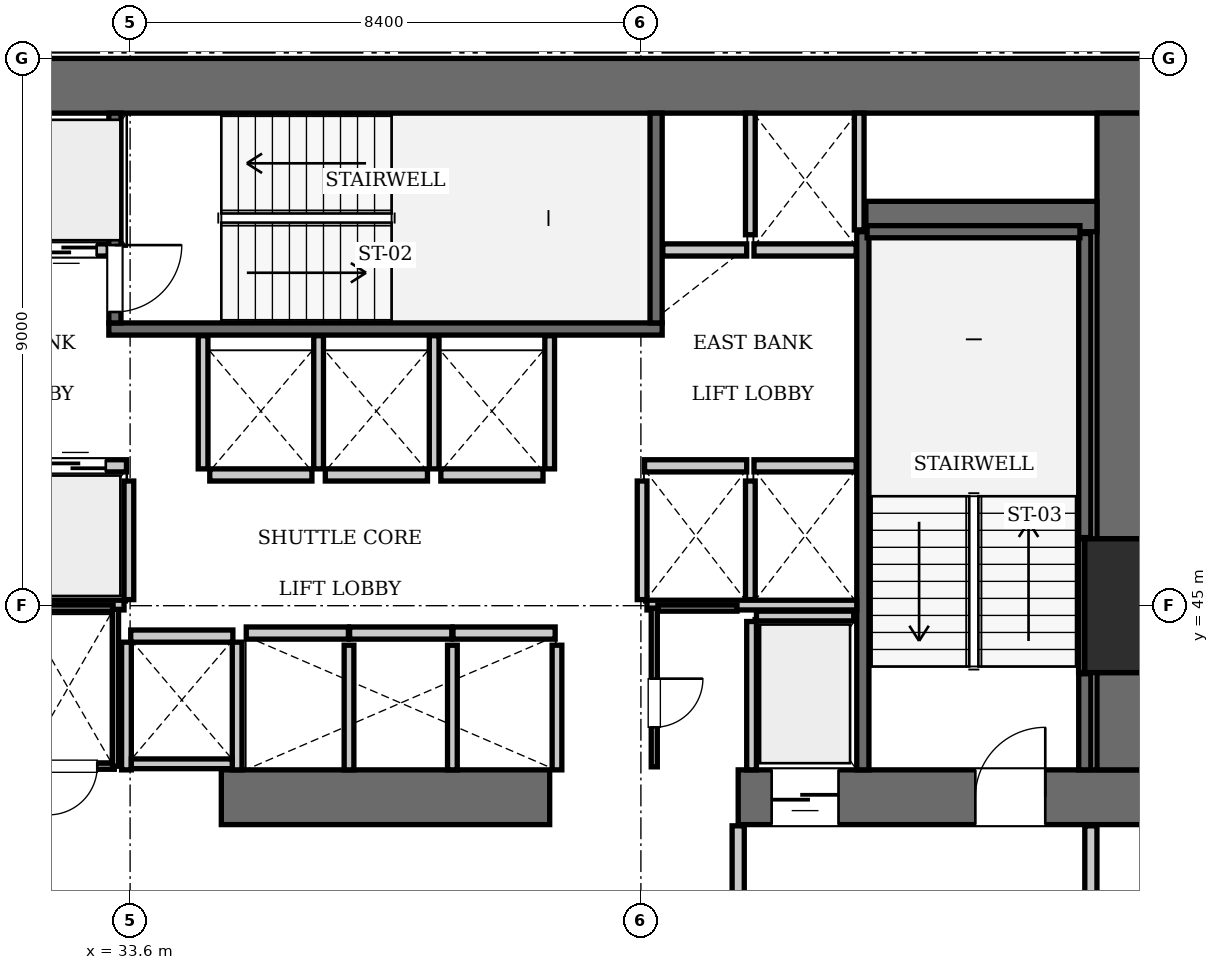
"""IFC4 building model, lengths in metres.
Left out: names, types, materials, properties, quantities, classifications, styles, units other than length and angle.
Written with IfcOpenShell. Run it as: python <this file> out.ifc"""

import sys

from ifc_helpers import new_model, si_unit, direction, frame, frame_2d, origin, origin_2d, place, context, subcontext, project, spatial, rectangle, extrude, element, fill, save


model = new_model("IFC4")
c1 = context("Model", 3, precision=1e-05, world=origin(), true_north=direction((0.0, 1.0)))
c2 = subcontext(c1, "Body", "Model", "MODEL_VIEW")
j1 = project(units=[si_unit("LENGTHUNIT", "METRE"), si_unit("PLANEANGLEUNIT", "RADIAN")], contexts=[c1])
p1 = place(None, origin())
s1 = spatial("IfcSite", under=j1, at=p1, CompositionType="ELEMENT")
p2 = place(p1, origin())
s2 = spatial("IfcBuilding", under=s1, at=p2, CompositionType="ELEMENT")
p3 = place(p2, frame((0.0, 0.0, 80.85)))
s3 = spatial("IfcBuildingStorey", under=s2, at=p3, CompositionType="ELEMENT", Elevation=80.85)
p4 = place(p3, frame((50.4, 45.0, 0.0), z_axis=(0.0, 0.0, 1.0), x_axis=(1.0, 0.0, 0.0)))
e1 = element("IfcColumn", 1, at=p4, inside=s3, PredefinedType="COLUMN", context=c2, shape_type="SweptSolid", body=[
    extrude(rectangle(XDim=2.2, YDim=2.2, at=origin_2d()), origin(), (0.0, 0.0, 1.0), 3.85),
])
p5 = place(p3, frame((25.2, 53.55, 0.0), z_axis=(0.0, 0.0, 1.0), x_axis=(1.0, 0.0, 0.0)))
e2 = element("IfcWall", 2, at=p5, inside=s3, PredefinedType="SHEAR", context=c2, shape_type="SweptSolid", body=[
    extrude(rectangle(XDim=25.2, YDim=0.9, at=frame_2d((12.6, 0.0))), origin(), (0.0, 0.0, 1.0), 3.85),
])
p6 = place(p3, frame((35.1, 41.85, 0.0), z_axis=(0.0, 0.0, 1.0), x_axis=(1.0, 0.0, 0.0)))
e3 = element("IfcWall", 3, at=p6, inside=s3, PredefinedType="SHEAR", context=c2, shape_type="SweptSolid", body=[
    extrude(rectangle(XDim=5.4, YDim=0.9, at=frame_2d((2.7, 0.0))), origin(), (0.0, 0.0, 1.0), 3.85),
])
p7 = place(p3, frame((43.6, 41.85, 0.0), z_axis=(0.0, 0.0, 1.0), x_axis=(1.0, 0.0, 0.0)))
e4 = element("IfcWall", 4, at=p7, inside=s3, PredefinedType="SHEAR", context=c2, shape_type="SweptSolid", body=[
    extrude(rectangle(XDim=6.8, YDim=0.9, at=frame_2d((3.4, 0.0))), origin(), (0.0, 0.0, 1.0), 3.85),
])
p8 = place(p7, frame((3.9, 0.0, 0.0)))
e5 = element("IfcOpeningElement", 5, at=p8, cuts=e4, PredefinedType="OPENING", context=c2, shape_type="SweptSolid", body=[
    extrude(rectangle(XDim=1.15, YDim=2.15, at=frame_2d((0.575, 1.075))), frame((0.0, 0.46, 0.0), z_axis=(0.0, -1.0, 0.0), x_axis=(1.0, 0.0, 0.0)), (0.0, 0.0, 1.0), 0.92),
])
p9 = place(p7, frame((0.55, 0.0, 0.0)))
e6 = element("IfcOpeningElement", 6, at=p9, cuts=e4, PredefinedType="OPENING", context=c2, shape_type="SweptSolid", body=[
    extrude(rectangle(XDim=1.1, YDim=2.2, at=frame_2d((0.55, 1.1))), frame((0.0, 0.46, 0.0), z_axis=(0.0, -1.0, 0.0), x_axis=(1.0, 0.0, 0.0)), (0.0, 0.0, 1.0), 0.92),
])
p10 = place(p3, frame((49.95, 42.3, 0.0), z_axis=(0.0, 0.0, 1.0), x_axis=(0.0, 1.0, 0.0)))
e7 = element("IfcWall", 7, at=p10, inside=s3, PredefinedType="SHEAR", context=c2, shape_type="SweptSolid", body=[
    extrude(rectangle(XDim=1.6, YDim=0.9, at=frame_2d((0.8, 0.0))), origin(), (0.0, 0.0, 1.0), 3.85),
])
p11 = place(p3, frame((49.95, 46.1, 0.0), z_axis=(0.0, 0.0, 1.0), x_axis=(0.0, 1.0, 0.0)))
e8 = element("IfcWall", 8, at=p11, inside=s3, PredefinedType="SHEAR", context=c2, shape_type="SweptSolid", body=[
    extrude(rectangle(XDim=7.0, YDim=0.9, at=frame_2d((3.5, 0.0))), origin(), (0.0, 0.0, 1.0), 3.85),
])
p12 = place(p3, frame((45.7, 51.4, 0.0), z_axis=(0.0, 0.0, 1.0), x_axis=(1.0, 0.0, 0.0)))
e9 = element("IfcWall", 9, at=p12, inside=s3, PredefinedType="SHEAR", context=c2, shape_type="SweptSolid", body=[
    extrude(rectangle(XDim=3.8, YDim=0.5, at=frame_2d((1.9, 0.0))), origin(), (0.0, 0.0, 1.0), 3.85),
])
p13 = place(p3, frame((33.25, 49.55, 0.0), z_axis=(0.0, 0.0, 1.0), x_axis=(1.0, 0.0, 0.0)))
e10 = element("IfcWall", 10, at=p13, inside=s3, PredefinedType="SOLIDWALL", context=c2, shape_type="SweptSolid", body=[
    extrude(rectangle(XDim=9.1, YDim=0.2, at=frame_2d((4.55, 0.0))), origin(), (0.0, 0.0, 1.0), 3.61),
])
p14 = place(p3, frame((42.25, 49.65, 0.0), z_axis=(0.0, 0.0, 1.0), x_axis=(0.0, 1.0, 0.0)))
e11 = element("IfcWall", 11, at=p14, inside=s3, PredefinedType="SOLIDWALL", context=c2, shape_type="SweptSolid", body=[
    extrude(rectangle(XDim=3.45, YDim=0.2, at=frame_2d((1.725, 0.0))), origin(), (0.0, 0.0, 1.0), 3.61),
])
p15 = place(p3, frame((33.35, 49.65, 0.0), z_axis=(0.0, 0.0, 1.0), x_axis=(0.0, 1.0, 0.0)))
e12 = element("IfcWall", 12, at=p15, inside=s3, PredefinedType="SOLIDWALL", context=c2, shape_type="SweptSolid", body=[
    extrude(rectangle(XDim=3.45, YDim=0.2, at=frame_2d((1.725, 0.0))), origin(), (0.0, 0.0, 1.0), 3.61),
])
p16 = place(p15, frame((0.18, 0.0, 0.0)))
e13 = element("IfcOpeningElement", 13, at=p16, cuts=e12, PredefinedType="OPENING", context=c2, shape_type="SweptSolid", body=[
    extrude(rectangle(XDim=1.1, YDim=2.15, at=frame_2d((0.55, 1.075))), frame((0.0, 0.11, 0.0), z_axis=(0.0, -1.0, 0.0), x_axis=(1.0, 0.0, 0.0)), (0.0, 0.0, 1.0), 0.22),
])
p17 = place(p3, frame((45.65, 42.3, 0.0), z_axis=(0.0, 0.0, 1.0), x_axis=(0.0, 1.0, 0.0)))
e14 = element("IfcWall", 14, at=p17, inside=s3, PredefinedType="SOLIDWALL", context=c2, shape_type="SweptSolid", body=[
    extrude(rectangle(XDim=8.85, YDim=0.2, at=frame_2d((4.425, 0.0))), origin(), (0.0, 0.0, 1.0), 3.61),
])
p18 = place(p3, frame((49.3, 42.3, 0.0), z_axis=(0.0, 0.0, 1.0), x_axis=(0.0, 1.0, 0.0)))
e15 = element("IfcWall", 15, at=p18, inside=s3, PredefinedType="SOLIDWALL", context=c2, shape_type="SweptSolid", body=[
    extrude(rectangle(XDim=1.58, YDim=0.2, at=frame_2d((0.79, 0.0))), origin(), (0.0, 0.0, 1.0), 3.61),
])
p19 = place(p3, frame((49.3, 46.12, 0.0), z_axis=(0.0, 0.0, 1.0), x_axis=(0.0, 1.0, 0.0)))
e16 = element("IfcWall", 16, at=p19, inside=s3, PredefinedType="SOLIDWALL", context=c2, shape_type="SweptSolid", body=[
    extrude(rectangle(XDim=5.0, YDim=0.2, at=frame_2d((2.5, 0.0))), origin(), (0.0, 0.0, 1.0), 3.61),
])
p20 = place(p3, frame((45.72, 51.15, 0.0), z_axis=(0.0, 0.0, 1.0), x_axis=(1.0, 0.0, 0.0)))
e17 = element("IfcWall", 17, at=p20, inside=s3, PredefinedType="SOLIDWALL", context=c2, shape_type="SweptSolid", body=[
    extrude(rectangle(XDim=3.5, YDim=0.2, at=frame_2d((1.75, 0.0))), origin(), (0.0, 0.0, 1.0), 3.61),
])
p21 = place(p3, frame((49.248, 43.9, 0.0), z_axis=(0.0, 0.0, 1.0), x_axis=(0.0, 1.0, 0.0)))
e18 = element("IfcWall", 18, at=p21, inside=s3, PredefinedType="SOLIDWALL", context=c2, shape_type="SweptSolid", body=[
    extrude(rectangle(XDim=2.2, YDim=0.1, at=frame_2d((1.1, 0.0))), origin(), (0.0, 0.0, 1.0), 3.61),
])
p22 = place(p3, frame((31.86, 47.3, 0.0), z_axis=(0.0, 0.0, 1.0), x_axis=(1.0, 0.0, 0.0)))
e19 = element("IfcWall", 19, at=p22, inside=s3, PredefinedType="SOLIDWALL", context=c2, shape_type="SweptSolid", body=[
    extrude(rectangle(XDim=1.68, YDim=0.2, at=frame_2d((0.84, 0.0))), origin(), (0.0, 0.0, 1.0), 3.61),
])
p23 = place(p22, frame((0.34, 0.0, 0.0)))
e20 = element("IfcOpeningElement", 20, at=p23, cuts=e19, PredefinedType="OPENING", context=c2, shape_type="SweptSolid", body=[
    extrude(rectangle(XDim=1.0, YDim=2.15, at=frame_2d((0.5, 1.075))), frame((0.0, 0.11, 0.0), z_axis=(0.0, -1.0, 0.0), x_axis=(1.0, 0.0, 0.0)), (0.0, 0.0, 1.0), 0.22),
])
p24 = place(p3, frame((31.86, 50.85, 0.0), z_axis=(0.0, 0.0, 1.0), x_axis=(1.0, 0.0, 0.0)))
e21 = element("IfcWall", 21, at=p24, inside=s3, PredefinedType="SOLIDWALL", context=c2, shape_type="SweptSolid", body=[
    extrude(rectangle(XDim=1.38, YDim=0.2, at=frame_2d((0.69, 0.0))), origin(), (0.0, 0.0, 1.0), 3.61),
])
p25 = place(p24, frame((0.19, 0.0, 0.0)))
e22 = element("IfcOpeningElement", 22, at=p25, cuts=e21, PredefinedType="OPENING", context=c2, shape_type="SweptSolid", body=[
    extrude(rectangle(XDim=1.0, YDim=2.15, at=frame_2d((0.5, 1.075))), frame((0.0, 0.11, 0.0), z_axis=(0.0, -1.0, 0.0), x_axis=(1.0, 0.0, 0.0)), (0.0, 0.0, 1.0), 0.22),
])
for number, where, z_axis, x_axis in (
    (23, (42.06, 47.3, 0.0), (0.0, 0.0, 1.0), (1.0, 0.0, 0.0)),
    (24, (43.86, 47.3, 0.0), (0.0, 0.0, 1.0), (1.0, 0.0, 0.0)),
):
    element("IfcWall", number, at=place(p3, frame(where, z_axis=z_axis, x_axis=x_axis)), inside=s3, PredefinedType="SOLIDWALL", context=c2, shape_type="SweptSolid", body=[
        extrude(rectangle(XDim=1.68, YDim=0.2, at=frame_2d((0.84, 0.0))), origin(), (0.0, 0.0, 1.0), 3.61),
    ])
p26 = place(p3, frame((42.36, 50.85, 0.0), z_axis=(0.0, 0.0, 1.0), x_axis=(1.0, 0.0, 0.0)))
e25 = element("IfcWall", 25, at=p26, inside=s3, PredefinedType="SOLIDWALL", context=c2, shape_type="SweptSolid", body=[
    extrude(rectangle(XDim=1.38, YDim=0.2, at=frame_2d((0.69, 0.0))), origin(), (0.0, 0.0, 1.0), 3.61),
])
for number, where, z_axis, x_axis in (
    (26, (43.86, 50.85, 0.0), (0.0, 0.0, 1.0), (1.0, 0.0, 0.0)),
    (27, (35.51, 44.55, 0.0), (0.0, 0.0, 1.0), (1.0, 0.0, 0.0)),
    (28, (37.21, 44.55, 0.0), (0.0, 0.0, 1.0), (1.0, 0.0, 0.0)),
):
    element("IfcWall", number, at=place(p3, frame(where, z_axis=z_axis, x_axis=x_axis)), inside=s3, PredefinedType="SOLIDWALL", context=c2, shape_type="SweptSolid", body=[
        extrude(rectangle(XDim=1.68, YDim=0.2, at=frame_2d((0.84, 0.0))), origin(), (0.0, 0.0, 1.0), 3.61),
    ])
for number, where, z_axis, x_axis in (
    (29, (38.91, 44.55, 0.0), (0.0, 0.0, 1.0), (1.0, 0.0, 0.0)),
    (30, (34.91, 47.15, 0.0), (0.0, 0.0, 1.0), (1.0, 0.0, 0.0)),
):
    element("IfcWall", number, at=place(p3, frame(where, z_axis=z_axis, x_axis=x_axis)), inside=s3, PredefinedType="SOLIDWALL", context=c2, shape_type="SweptSolid", body=[
        extrude(rectangle(XDim=1.68, YDim=0.2, at=frame_2d((0.84, 0.0))), origin(), (0.0, 0.0, 1.0), 3.61),
    ])
for number, where, z_axis, x_axis in (
    (31, (36.81, 47.15, 0.0), (0.0, 0.0, 1.0), (1.0, 0.0, 0.0)),
    (32, (38.71, 47.15, 0.0), (0.0, 0.0, 1.0), (1.0, 0.0, 0.0)),
    (33, (33.61, 44.5, 0.0), (0.0, 0.0, 1.0), (1.0, 0.0, 0.0)),
):
    element("IfcWall", number, at=place(p3, frame(where, z_axis=z_axis, x_axis=x_axis)), inside=s3, PredefinedType="SOLIDWALL", context=c2, shape_type="SweptSolid", body=[
        extrude(rectangle(XDim=1.68, YDim=0.2, at=frame_2d((0.84, 0.0))), origin(), (0.0, 0.0, 1.0), 3.61),
    ])
p27 = place(p3, frame((43.9, 44.83, 0.0), z_axis=(0.0, 0.0, 1.0), x_axis=(1.0, 0.0, 0.0)))
e34 = element("IfcWall", 34, at=p27, inside=s3, PredefinedType="SOLIDWALL", context=c2, shape_type="SweptSolid", body=[
    extrude(rectangle(XDim=1.6, YDim=0.16, at=frame_2d((0.8, 0.0))), origin(), (0.0, 0.0, 1.0), 3.61),
])
p28 = place(p3, frame((43.82, 42.3, 0.0), z_axis=(0.0, 0.0, 1.0), x_axis=(0.0, 1.0, 0.0)))
e35 = element("IfcWall", 35, at=p28, inside=s3, PredefinedType="SOLIDWALL", context=c2, shape_type="SweptSolid", body=[
    extrude(rectangle(XDim=2.44, YDim=0.16, at=frame_2d((1.22, 0.0))), origin(), (0.0, 0.0, 1.0), 3.61),
])
p29 = place(p3, frame((33.58, 45.1, 0.0), z_axis=(0.0, 0.0, 1.0), x_axis=(0.0, 1.0, 0.0)))
e36 = element("IfcWall", 36, at=p29, inside=s3, PredefinedType="SOLIDWALL", context=c2, shape_type="SweptSolid", body=[
    extrude(rectangle(XDim=1.95, YDim=0.16, at=frame_2d((0.975, 0.0))), origin(), (0.0, 0.0, 1.0), 3.61),
])
p30 = place(p3, frame((30.05, 45.01, 0.0), z_axis=(0.0, 0.0, 1.0), x_axis=(1.0, 0.0, 0.0)))
e37 = element("IfcWall", 37, at=p30, inside=s3, PredefinedType="SOLIDWALL", context=c2, shape_type="SweptSolid", body=[
    extrude(rectangle(XDim=3.45, YDim=0.16, at=frame_2d((1.725, 0.0))), origin(), (0.0, 0.0, 1.0), 3.61),
])
for number, where, z_axis, x_axis in (
    (38, (42.02, 45.1, 0.0), (0.0, 0.0, 1.0), (0.0, 1.0, 0.0)),
    (39, (43.8, 45.1, 0.0), (0.0, 0.0, 1.0), (0.0, 1.0, 0.0)),
):
    element("IfcWall", number, at=place(p3, frame(where, z_axis=z_axis, x_axis=x_axis)), inside=s3, PredefinedType="SOLIDWALL", context=c2, shape_type="SweptSolid", body=[
        extrude(rectangle(XDim=1.95, YDim=0.16, at=frame_2d((0.975, 0.0))), origin(), (0.0, 0.0, 1.0), 3.61),
    ])
p31 = place(p3, frame((42.1, 45.01, 0.0), z_axis=(0.0, 0.0, 1.0), x_axis=(1.0, 0.0, 0.0)))
e40 = element("IfcWall", 40, at=p31, inside=s3, PredefinedType="SOLIDWALL", context=c2, shape_type="SweptSolid", body=[
    extrude(rectangle(XDim=3.45, YDim=0.16, at=frame_2d((1.725, 0.0))), origin(), (0.0, 0.0, 1.0), 3.61),
])
p32 = place(p3, frame((45.59, 51.18, 0.0), z_axis=(0.0, 0.0, 1.0), x_axis=(0.0, 1.0, 0.0)))
e41 = element("IfcWall", 41, at=p32, inside=s3, PredefinedType="SOLIDWALL", context=c2, shape_type="SweptSolid", body=[
    extrude(rectangle(XDim=1.92, YDim=0.16, at=frame_2d((0.96, 0.0))), origin(), (0.0, 0.0, 1.0), 3.61),
])
p33 = place(p3, frame((43.8, 51.1, 0.0), z_axis=(0.0, 0.0, 1.0), x_axis=(0.0, 1.0, 0.0)))
e42 = element("IfcWall", 42, at=p33, inside=s3, PredefinedType="SOLIDWALL", context=c2, shape_type="SweptSolid", body=[
    extrude(rectangle(XDim=2.0, YDim=0.16, at=frame_2d((1.0, 0.0))), origin(), (0.0, 0.0, 1.0), 3.61),
])
for number, where, z_axis, x_axis in (
    (43, (37.2, 42.3, 0.0), (0.0, 0.0, 1.0), (0.0, 1.0, 0.0)),
    (44, (38.9, 42.3, 0.0), (0.0, 0.0, 1.0), (0.0, 1.0, 0.0)),
    (45, (40.62, 42.3, 0.0), (0.0, 0.0, 1.0), (0.0, 1.0, 0.0)),
):
    element("IfcWall", number, at=place(p3, frame(where, z_axis=z_axis, x_axis=x_axis)), inside=s3, PredefinedType="SOLIDWALL", context=c2, shape_type="SweptSolid", body=[
        extrude(rectangle(XDim=2.05, YDim=0.16, at=frame_2d((1.025, 0.0))), origin(), (0.0, 0.0, 1.0), 3.61),
    ])
for number, where, z_axis, x_axis in (
    (46, (34.8, 47.25, 0.0), (0.0, 0.0, 1.0), (0.0, 1.0, 0.0)),
    (47, (36.7, 47.25, 0.0), (0.0, 0.0, 1.0), (0.0, 1.0, 0.0)),
    (48, (38.6, 47.25, 0.0), (0.0, 0.0, 1.0), (0.0, 1.0, 0.0)),
    (49, (40.5, 47.25, 0.0), (0.0, 0.0, 1.0), (0.0, 1.0, 0.0)),
):
    element("IfcWall", number, at=place(p3, frame(where, z_axis=z_axis, x_axis=x_axis)), inside=s3, PredefinedType="SOLIDWALL", context=c2, shape_type="SweptSolid", body=[
        extrude(rectangle(XDim=2.19, YDim=0.16, at=frame_2d((1.095, 0.0))), origin(), (0.0, 0.0, 1.0), 3.61),
    ])
for number, where, z_axis, x_axis in (
    (50, (33.54, 42.3, 0.0), (0.0, 0.0, 1.0), (0.0, 1.0, 0.0)),
    (51, (35.36, 42.3, 0.0), (0.0, 0.0, 1.0), (0.0, 1.0, 0.0)),
):
    element("IfcWall", number, at=place(p3, frame(where, z_axis=z_axis, x_axis=x_axis)), inside=s3, PredefinedType="SOLIDWALL", context=c2, shape_type="SweptSolid", body=[
        extrude(rectangle(XDim=2.1, YDim=0.16, at=frame_2d((1.05, 0.0))), origin(), (0.0, 0.0, 1.0), 3.61),
    ])
p34 = place(p3, frame((33.62, 42.4, 0.0), z_axis=(0.0, 0.0, 1.0), x_axis=(1.0, 0.0, 0.0)))
e52 = element("IfcWall", 52, at=p34, inside=s3, PredefinedType="SOLIDWALL", context=c2, shape_type="SweptSolid", body=[
    extrude(rectangle(XDim=1.66, YDim=0.16, at=frame_2d((0.83, 0.0))), origin(), (0.0, 0.0, 1.0), 3.61),
])
for number, where, z_axis, x_axis in (
    (53, (43.6, 38.31, 0.0), (0.0, 0.0, 1.0), (0.0, 1.0, 0.0)),
    (54, (49.4, 38.31, 0.0), (0.0, 0.0, 1.0), (0.0, 1.0, 0.0)),
):
    element("IfcWall", number, at=place(p3, frame(where, z_axis=z_axis, x_axis=x_axis)), inside=s3, PredefinedType="PARTITIONING", context=c2, shape_type="SweptSolid", body=[
        extrude(rectangle(XDim=3.07, YDim=0.2, at=frame_2d((1.535, 0.0))), origin(), (0.0, 0.0, 1.0), 3.61),
    ])
p35 = place(p3, frame((32.02, 42.36, 0.0), z_axis=(0.0, 0.0, 1.0), x_axis=(1.0, 0.0, 0.0)))
e55 = element("IfcWall", 55, at=p35, inside=s3, PredefinedType="PARTITIONING", context=c2, shape_type="SweptSolid", body=[
    extrude(rectangle(XDim=1.32, YDim=0.1, at=frame_2d((0.66, 0.0))), origin(), (0.0, 0.0, 1.0), 3.61),
])
p36 = place(p35, frame((0.24, 0.0, 0.0)))
e56 = element("IfcOpeningElement", 56, at=p36, cuts=e55, PredefinedType="OPENING", context=c2, shape_type="SweptSolid", body=[
    extrude(rectangle(XDim=0.8, YDim=2.05, at=frame_2d((0.4, 1.025))), frame((0.0, 0.06, 0.0), z_axis=(0.0, -1.0, 0.0), x_axis=(1.0, 0.0, 0.0)), (0.0, 0.0, 1.0), 0.12),
])
p37 = place(p3, frame((31.84, 44.96, 0.0), z_axis=(0.0, 0.0, 1.0), x_axis=(1.0, 0.0, 0.0)))
e57 = element("IfcWall", 57, at=p37, inside=s3, PredefinedType="PARTITIONING", context=c2, shape_type="SweptSolid", body=[
    extrude(rectangle(XDim=1.48, YDim=0.1, at=frame_2d((0.74, 0.0))), origin(), (0.0, 0.0, 1.0), 3.61),
])
p38 = place(p3, frame((33.36, 42.36, 0.0), z_axis=(0.0, 0.0, 1.0), x_axis=(0.0, 1.0, 0.0)))
e58 = element("IfcWall", 58, at=p38, inside=s3, PredefinedType="PARTITIONING", context=c2, shape_type="SweptSolid", body=[
    extrude(rectangle(XDim=2.58, YDim=0.1, at=frame_2d((1.29, 0.0))), origin(), (0.0, 0.0, 1.0), 3.61),
])
p39 = place(p3, frame((42.22, 42.35, 0.0), z_axis=(0.0, 0.0, 1.0), x_axis=(0.0, 1.0, 0.0)))
e59 = element("IfcWall", 59, at=p39, inside=s3, PredefinedType="PARTITIONING", context=c2, shape_type="SweptSolid", body=[
    extrude(rectangle(XDim=2.61, YDim=0.1, at=frame_2d((1.305, 0.0))), origin(), (0.0, 0.0, 1.0), 3.61),
])
p40 = place(p39, frame((0.65, 0.0, 0.0)))
e60 = element("IfcOpeningElement", 60, at=p40, cuts=e59, PredefinedType="OPENING", context=c2, shape_type="SweptSolid", body=[
    extrude(rectangle(XDim=0.8, YDim=2.05, at=frame_2d((0.4, 1.025))), frame((0.0, 0.06, 0.0), z_axis=(0.0, -1.0, 0.0), x_axis=(1.0, 0.0, 0.0)), (0.0, 0.0, 1.0), 0.12),
])
p41 = place(p3, frame((42.28, 44.96, 0.0), z_axis=(0.0, 0.0, 1.0), x_axis=(1.0, 0.0, 0.0)))
e61 = element("IfcWall", 61, at=p41, inside=s3, PredefinedType="PARTITIONING", context=c2, shape_type="SweptSolid", body=[
    extrude(rectangle(XDim=1.3, YDim=0.1, at=frame_2d((0.65, 0.0))), origin(), (0.0, 0.0, 1.0), 3.61),
])
p42 = place(p16, frame((1.1, 0.0, 0.0), z_axis=(0.0, 0.0, 1.0), x_axis=(-1.0, 0.0, 0.0)))
e62 = element("IfcDoor", 62, at=p42, inside=s3, OperationType="SINGLE_SWING_LEFT", PredefinedType="DOOR", context=c2, shape_type="SweptSolid", body=[
    extrude(rectangle(XDim=1.1, YDim=2.15, at=frame_2d((0.55, 1.075))), frame((0.0, 0.025, 0.0), z_axis=(0.0, -1.0, 0.0), x_axis=(1.0, 0.0, 0.0)), (0.0, 0.0, 1.0), 0.05),
])
fill(e13, e62)
p43 = place(p8, origin())
e63 = element("IfcDoor", 63, at=p43, inside=s3, OperationType="SINGLE_SWING_RIGHT", PredefinedType="DOOR", context=c2, shape_type="SweptSolid", body=[
    extrude(rectangle(XDim=1.15, YDim=2.15, at=frame_2d((0.575, 1.075))), frame((0.0, 0.025, 0.0), z_axis=(0.0, -1.0, 0.0), x_axis=(1.0, 0.0, 0.0)), (0.0, 0.0, 1.0), 0.05),
])
fill(e5, e63)
p44 = place(p23, origin())
e64 = element("IfcDoor", 64, at=p44, inside=s3, OperationType="SLIDING_TO_LEFT", PredefinedType="DOOR", context=c2, shape_type="SweptSolid", body=[
    extrude(rectangle(XDim=1.0, YDim=2.15, at=frame_2d((0.5, 1.075))), frame((0.0, 0.025, 0.0), z_axis=(0.0, -1.0, 0.0), x_axis=(1.0, 0.0, 0.0)), (0.0, 0.0, 1.0), 0.05),
])
fill(e20, e64)
p45 = place(p25, frame((1.0, 0.0, 0.0), z_axis=(0.0, 0.0, 1.0), x_axis=(-1.0, 0.0, 0.0)))
e65 = element("IfcDoor", 65, at=p45, inside=s3, OperationType="SLIDING_TO_LEFT", PredefinedType="DOOR", context=c2, shape_type="SweptSolid", body=[
    extrude(rectangle(XDim=1.0, YDim=2.15, at=frame_2d((0.5, 1.075))), frame((0.0, 0.025, 0.0), z_axis=(0.0, -1.0, 0.0), x_axis=(1.0, 0.0, 0.0)), (0.0, 0.0, 1.0), 0.05),
])
fill(e22, e65)
p46 = place(p9, frame((1.1, 0.0, 0.0), z_axis=(0.0, 0.0, 1.0), x_axis=(-1.0, 0.0, 0.0)))
e66 = element("IfcDoor", 66, at=p46, inside=s3, OperationType="SLIDING_TO_LEFT", PredefinedType="DOOR", context=c2, shape_type="SweptSolid", body=[
    extrude(rectangle(XDim=1.1, YDim=2.2, at=frame_2d((0.55, 1.1))), frame((0.0, 0.025, 0.0), z_axis=(0.0, -1.0, 0.0), x_axis=(1.0, 0.0, 0.0)), (0.0, 0.0, 1.0), 0.05),
])
fill(e6, e66)
p47 = place(p36, frame((0.8, 0.0, 0.0), z_axis=(0.0, 0.0, 1.0), x_axis=(-1.0, 0.0, 0.0)))
e67 = element("IfcDoor", 67, at=p47, inside=s3, OperationType="SINGLE_SWING_RIGHT", PredefinedType="DOOR", context=c2, shape_type="SweptSolid", body=[
    extrude(rectangle(XDim=0.8, YDim=2.05, at=frame_2d((0.4, 1.025))), frame((0.0, 0.025, 0.0), z_axis=(0.0, -1.0, 0.0), x_axis=(1.0, 0.0, 0.0)), (0.0, 0.0, 1.0), 0.05),
])
fill(e56, e67)
p48 = place(p40, frame((0.8, 0.0, 0.0), z_axis=(0.0, 0.0, 1.0), x_axis=(-1.0, 0.0, 0.0)))
e68 = element("IfcDoor", 68, at=p48, inside=s3, OperationType="SINGLE_SWING_LEFT", PredefinedType="DOOR", context=c2, shape_type="SweptSolid", body=[
    extrude(rectangle(XDim=0.8, YDim=2.05, at=frame_2d((0.4, 1.025))), frame((0.0, 0.025, 0.0), z_axis=(0.0, -1.0, 0.0), x_axis=(1.0, 0.0, 0.0)), (0.0, 0.0, 1.0), 0.05),
])
fill(e60, e68)
save(model, sys.argv[1])
